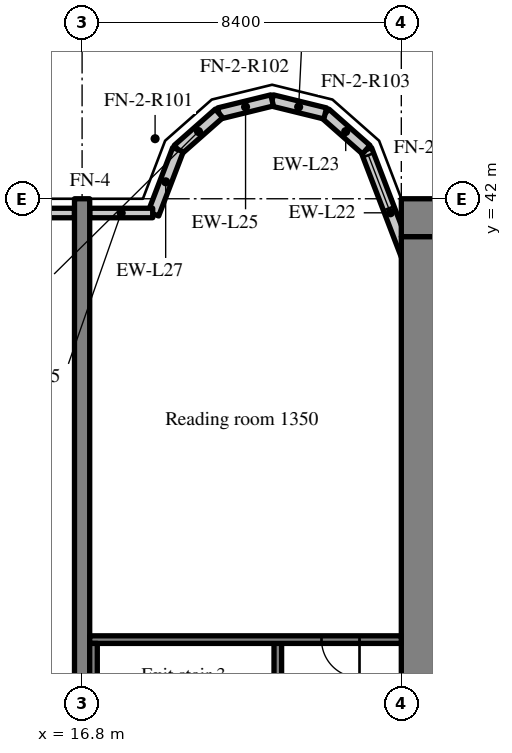
"""IFC4 building model, lengths in metres.
Left out: names, types, materials, properties, quantities, classifications, styles, units other than length and angle.
Written with IfcOpenShell. Run it as: python <this file> out.ifc"""

import sys

from ifc_helpers import new_model, si_unit, direction, frame, frame_2d, origin, place, context, subcontext, project, spatial, rectangle, extrude, source, transform, mapped, element, fill, save


model = new_model("IFC4")
c1 = context("Model", 3, precision=1e-05, world=origin(), true_north=direction((0.0, 1.0)))
c2 = subcontext(c1, "Body", "Model", "MODEL_VIEW")
j1 = project(units=[si_unit("LENGTHUNIT", "METRE"), si_unit("PLANEANGLEUNIT", "RADIAN")], contexts=[c1])
p1 = place(None, origin())
s1 = spatial("IfcSite", under=j1, at=p1, CompositionType="ELEMENT")
p2 = place(p1, origin())
s2 = spatial("IfcBuilding", under=s1, at=p2, CompositionType="ELEMENT")
p3 = place(p2, frame((0.0, 0.0, 58.2)))
s3 = spatial("IfcBuildingStorey", under=s2, at=p3, CompositionType="ELEMENT", Elevation=58.2)
m1 = source(origin(), c2, "Body", "SweptSolid", [
    extrude(rectangle(XDim=50.4, YDim=1.0, at=frame_2d((25.2, 0.0))), origin(), (0.0, 0.0, 1.0), 3.52),
])
p4 = place(p3, frame((25.2, 41.5, 0.0), z_axis=(0.0, 0.0, 1.0), x_axis=(1.0, 0.0, 0.0)))
e1 = element("IfcWall", 1, at=p4, inside=s3, PredefinedType="SHEAR", context=c2, shape_type="MappedRepresentation", body=[
    mapped(m1, transform((0.0, 0.0, 0.0), scale=1.0)),
])
m2 = source(origin(), c2, "Body", "SweptSolid", [
    extrude(rectangle(XDim=18.0, YDim=1.0, at=frame_2d((9.0, 0.0))), origin(), (0.0, 0.0, 1.0), 3.52),
])
p5 = place(p3, frame((25.7, 23.0, 0.0), z_axis=(0.0, 0.0, 1.0), x_axis=(0.0, 1.0, 0.0)))
e2 = element("IfcWall", 2, at=p5, inside=s3, PredefinedType="SHEAR", context=c2, shape_type="MappedRepresentation", body=[
    mapped(m2, transform((0.0, 0.0, 0.0), scale=1.0)),
])
m3 = source(origin(), c2, "Body", "SweptSolid", [
    extrude(rectangle(XDim=20.0, YDim=0.4, at=frame_2d((10.0, 0.0))), origin(), (0.0, 0.0, 1.0), 3.52),
])
p6 = place(p3, frame((16.8, 22.0, 0.0), z_axis=(0.0, 0.0, 1.0), x_axis=(0.0, 1.0, 0.0)))
e3 = element("IfcWall", 3, at=p6, inside=s3, PredefinedType="SHEAR", context=c2, shape_type="MappedRepresentation", body=[
    mapped(m3, transform((0.0, 0.0, 0.0), scale=1.0)),
])
m4 = source(origin(), c2, "Body", "SweptSolid", [
    extrude(rectangle(XDim=3.559, YDim=0.3, at=frame_2d((1.78, 0.0))), origin(), (0.0, 0.0, 1.0), 3.52),
])
p7 = place(p3, frame((25.55, 39.969, 0.0), z_axis=(0.0, 0.0, 1.0), x_axis=(-0.35779745313, 0.933799219604, 0.0)))
e4 = element("IfcWall", 4, at=p7, inside=s3, PredefinedType="SOLIDWALL", context=c2, shape_type="MappedRepresentation", body=[
    mapped(m4, transform((0.0, 0.0, 0.0), scale=1.0)),
])
m5 = source(origin(), c2, "Body", "SweptSolid", [
    extrude(rectangle(XDim=1.5, YDim=2.0, at=frame_2d((0.75, 1.0))), frame((0.0, 0.16, 0.0), z_axis=(0.0, -1.0, 0.0), x_axis=(1.0, 0.0, 0.0)), (0.0, 0.0, 1.0), 0.32),
])
p8 = place(p7, frame((1.903, 0.0, 0.9)))
e5 = element("IfcOpeningElement", 5, at=p8, cuts=e4, PredefinedType="OPENING", context=c2, shape_type="MappedRepresentation", body=[
    mapped(m5, transform((0.0, 0.0, 0.0), scale=1.0)),
])
m6 = source(origin(), c2, "Body", "SweptSolid", [
    extrude(rectangle(XDim=1.44, YDim=0.3, at=frame_2d((0.72, 0.0))), origin(), (0.0, 0.0, 1.0), 3.52),
])
p9 = place(p3, frame((24.277, 43.292, 0.0), z_axis=(0.0, 0.0, 1.0), x_axis=(-0.749649827867, 0.661834673902, 0.0)))
e6 = element("IfcWall", 6, at=p9, inside=s3, PredefinedType="SOLIDWALL", context=c2, shape_type="MappedRepresentation", body=[
    mapped(m6, transform((0.0, 0.0, 0.0), scale=1.0)),
])
m7 = source(origin(), c2, "Body", "SweptSolid", [
    extrude(rectangle(XDim=1.438, YDim=0.3, at=frame_2d((0.719, 0.0))), origin(), (0.0, 0.0, 1.0), 3.52),
])
p10 = place(p3, frame((23.197, 44.245, 0.0), z_axis=(0.0, 0.0, 1.0), x_axis=(-0.971152283879, 0.238460146601, 0.0)))
e7 = element("IfcWall", 7, at=p10, inside=s3, PredefinedType="SOLIDWALL", context=c2, shape_type="MappedRepresentation", body=[
    mapped(m7, transform((0.0, 0.0, 0.0), scale=1.0)),
])
m8 = source(origin(), c2, "Body", "SweptSolid", [
    extrude(rectangle(XDim=1.439, YDim=0.3, at=frame_2d((0.719, 0.0))), origin(), (0.0, 0.0, 1.0), 3.52),
])
p11 = place(p3, frame((21.8, 44.588, 0.0), z_axis=(0.0, 0.0, 1.0), x_axis=(-0.971161932466, -0.238420848351, 0.0)))
e8 = element("IfcWall", 8, at=p11, inside=s3, PredefinedType="SOLIDWALL", context=c2, shape_type="MappedRepresentation", body=[
    mapped(m8, transform((0.0, 0.0, 0.0), scale=1.0)),
])
m9 = source(origin(), c2, "Body", "SweptSolid", [
    extrude(rectangle(XDim=1.44, YDim=0.3, at=frame_2d((0.72, 0.0))), origin(), (0.0, 0.0, 1.0), 3.52),
])
p12 = place(p3, frame((20.403, 44.245, 0.0), z_axis=(0.0, 0.0, 1.0), x_axis=(-0.74957555648, -0.661918790432, 0.0)))
e9 = element("IfcWall", 9, at=p12, inside=s3, PredefinedType="SOLIDWALL", context=c2, shape_type="MappedRepresentation", body=[
    mapped(m9, transform((0.0, 0.0, 0.0), scale=1.0)),
])
m10 = source(origin(), c2, "Body", "SweptSolid", [
    extrude(rectangle(XDim=1.812, YDim=0.3, at=frame_2d((0.906, 0.0))), origin(), (0.0, 0.0, 1.0), 3.52),
])
p13 = place(p3, frame((19.323, 43.292, 0.0), z_axis=(0.0, 0.0, 1.0), x_axis=(-0.357877270961, -0.93376863244, 0.0)))
e10 = element("IfcWall", 10, at=p13, inside=s3, PredefinedType="SOLIDWALL", context=c2, shape_type="MappedRepresentation", body=[
    mapped(m10, transform((0.0, 0.0, 0.0), scale=1.0)),
])
m11 = source(origin(), c2, "Body", "SweptSolid", [
    extrude(rectangle(XDim=3.6, YDim=0.25, at=frame_2d((1.8, 0.0))), origin(), (0.0, 0.0, 1.0), 2.82),
])
p14 = place(p3, frame((16.6, 41.625, 0.0), z_axis=(0.0, 0.0, 1.0), x_axis=(-1.0, 0.0, 0.0)))
e11 = element("IfcWall", 11, at=p14, inside=s3, PredefinedType="SOLIDWALL", context=c2, shape_type="MappedRepresentation", body=[
    mapped(m11, transform((0.0, 0.0, 0.0), scale=1.0)),
])
m12 = source(origin(), c2, "Body", "SweptSolid", [
    extrude(rectangle(XDim=1.5, YDim=1.5, at=frame_2d((0.75, 0.75))), frame((0.0, 0.135, 0.0), z_axis=(0.0, -1.0, 0.0), x_axis=(1.0, 0.0, 0.0)), (0.0, 0.0, 1.0), 0.27),
])
p15 = place(p14, frame((1.05, 0.0, 0.9)))
e12 = element("IfcOpeningElement", 12, at=p15, cuts=e11, PredefinedType="OPENING", context=c2, shape_type="MappedRepresentation", body=[
    mapped(m12, transform((0.0, 0.0, 0.0), scale=1.0)),
])
m13 = source(origin(), c2, "Body", "SweptSolid", [
    extrude(rectangle(XDim=1.658, YDim=0.25, at=frame_2d((0.829, 0.0))), origin(), (0.0, 0.0, 1.0), 2.82),
])
p16 = place(p3, frame((18.658, 41.625, 0.0), z_axis=(0.0, 0.0, 1.0), x_axis=(-1.0, 0.0, 0.0)))
e13 = element("IfcWall", 13, at=p16, inside=s3, PredefinedType="SOLIDWALL", context=c2, shape_type="MappedRepresentation", body=[
    mapped(m13, transform((0.0, 0.0, 0.0), scale=1.0)),
])
m14 = source(origin(), c2, "Body", "SweptSolid", [
    extrude(rectangle(XDim=8.3, YDim=0.2, at=frame_2d((4.15, 0.0))), origin(), (0.0, 0.0, 1.0), 3.52),
])
p17 = place(p3, frame((21.95, 22.1, 0.0), z_axis=(0.0, 0.0, 1.0), x_axis=(0.0, 1.0, 0.0)))
e14 = element("IfcWall", 14, at=p17, inside=s3, PredefinedType="SOLIDWALL", context=c2, shape_type="MappedRepresentation", body=[
    mapped(m14, transform((0.0, 0.0, 0.0), scale=1.0)),
])
m15 = source(origin(), c2, "Body", "SweptSolid", [
    extrude(rectangle(XDim=1.2, YDim=2.1, at=frame_2d((0.6, 1.05))), frame((0.0, 0.11, 0.0), z_axis=(0.0, -1.0, 0.0), x_axis=(1.0, 0.0, 0.0)), (0.0, 0.0, 1.0), 0.22),
])
p18 = place(p17, frame((0.6, 0.0, 0.0)))
e15 = element("IfcOpeningElement", 15, at=p18, cuts=e14, PredefinedType="OPENING", context=c2, shape_type="MappedRepresentation", body=[
    mapped(m15, transform((0.0, 0.0, 0.0), scale=1.0)),
])
m16 = source(origin(), c2, "Body", "SweptSolid", [
    extrude(rectangle(XDim=8.2, YDim=0.2, at=frame_2d((4.1, 0.0))), origin(), (0.0, 0.0, 1.0), 3.52),
])
p19 = place(p3, frame((17.0, 30.4, 0.0), z_axis=(0.0, 0.0, 1.0), x_axis=(1.0, 0.0, 0.0)))
e16 = element("IfcWall", 16, at=p19, inside=s3, PredefinedType="SOLIDWALL", context=c2, shape_type="MappedRepresentation", body=[
    mapped(m16, transform((0.0, 0.0, 0.0), scale=1.0)),
])
m17 = source(origin(), c2, "Body", "SweptSolid", [
    extrude(rectangle(XDim=1.0, YDim=2.1, at=frame_2d((0.5, 1.05))), frame((0.0, 0.11, 0.0), z_axis=(0.0, -1.0, 0.0), x_axis=(1.0, 0.0, 0.0)), (0.0, 0.0, 1.0), 0.22),
])
p20 = place(p19, frame((6.1, 0.0, 0.0)))
e17 = element("IfcOpeningElement", 17, at=p20, cuts=e16, PredefinedType="OPENING", context=c2, shape_type="MappedRepresentation", body=[
    mapped(m17, transform((0.0, 0.0, 0.0), scale=1.0)),
])
m18 = source(origin(), c2, "Body", "SweptSolid", [
    extrude(rectangle(XDim=8.1, YDim=0.2, at=frame_2d((4.05, 0.0))), origin(), (0.0, 0.0, 1.0), 3.52),
])
p21 = place(p3, frame((17.1, 22.2, 0.0), z_axis=(0.0, 0.0, 1.0), x_axis=(0.0, 1.0, 0.0)))
e18 = element("IfcWall", 18, at=p21, inside=s3, PredefinedType="SOLIDWALL", context=c2, shape_type="MappedRepresentation", body=[
    mapped(m18, transform((0.0, 0.0, 0.0), scale=1.0)),
])
m19 = source(origin(), c2, "Body", "SweptSolid", [
    extrude(rectangle(XDim=1.5, YDim=2.0, at=frame_2d((0.75, 1.0))), frame((0.0, 0.03, 0.0), z_axis=(0.0, -1.0, 0.0), x_axis=(1.0, 0.0, 0.0)), (0.0, 0.0, 1.0), 0.06),
])
p22 = place(p8, origin())
e19 = element("IfcWindow", 19, at=p22, inside=s3, PartitioningType="SINGLE_PANEL", PredefinedType="WINDOW", context=c2, shape_type="MappedRepresentation", body=[
    mapped(m19, transform((0.0, 0.0, 0.0), scale=1.0)),
])
fill(e5, e19)
m20 = source(origin(), c2, "Body", "SweptSolid", [
    extrude(rectangle(XDim=1.0, YDim=2.1, at=frame_2d((0.5, 1.05))), frame((0.0, 0.025, 0.0), z_axis=(0.0, -1.0, 0.0), x_axis=(1.0, 0.0, 0.0)), (0.0, 0.0, 1.0), 0.05),
])
p23 = place(p20, origin())
e20 = element("IfcDoor", 20, at=p23, inside=s3, OperationType="SINGLE_SWING_RIGHT", PredefinedType="DOOR", context=c2, shape_type="MappedRepresentation", body=[
    mapped(m20, transform((0.0, 0.0, 0.0), scale=1.0)),
])
fill(e17, e20)
save(model, sys.argv[1])
